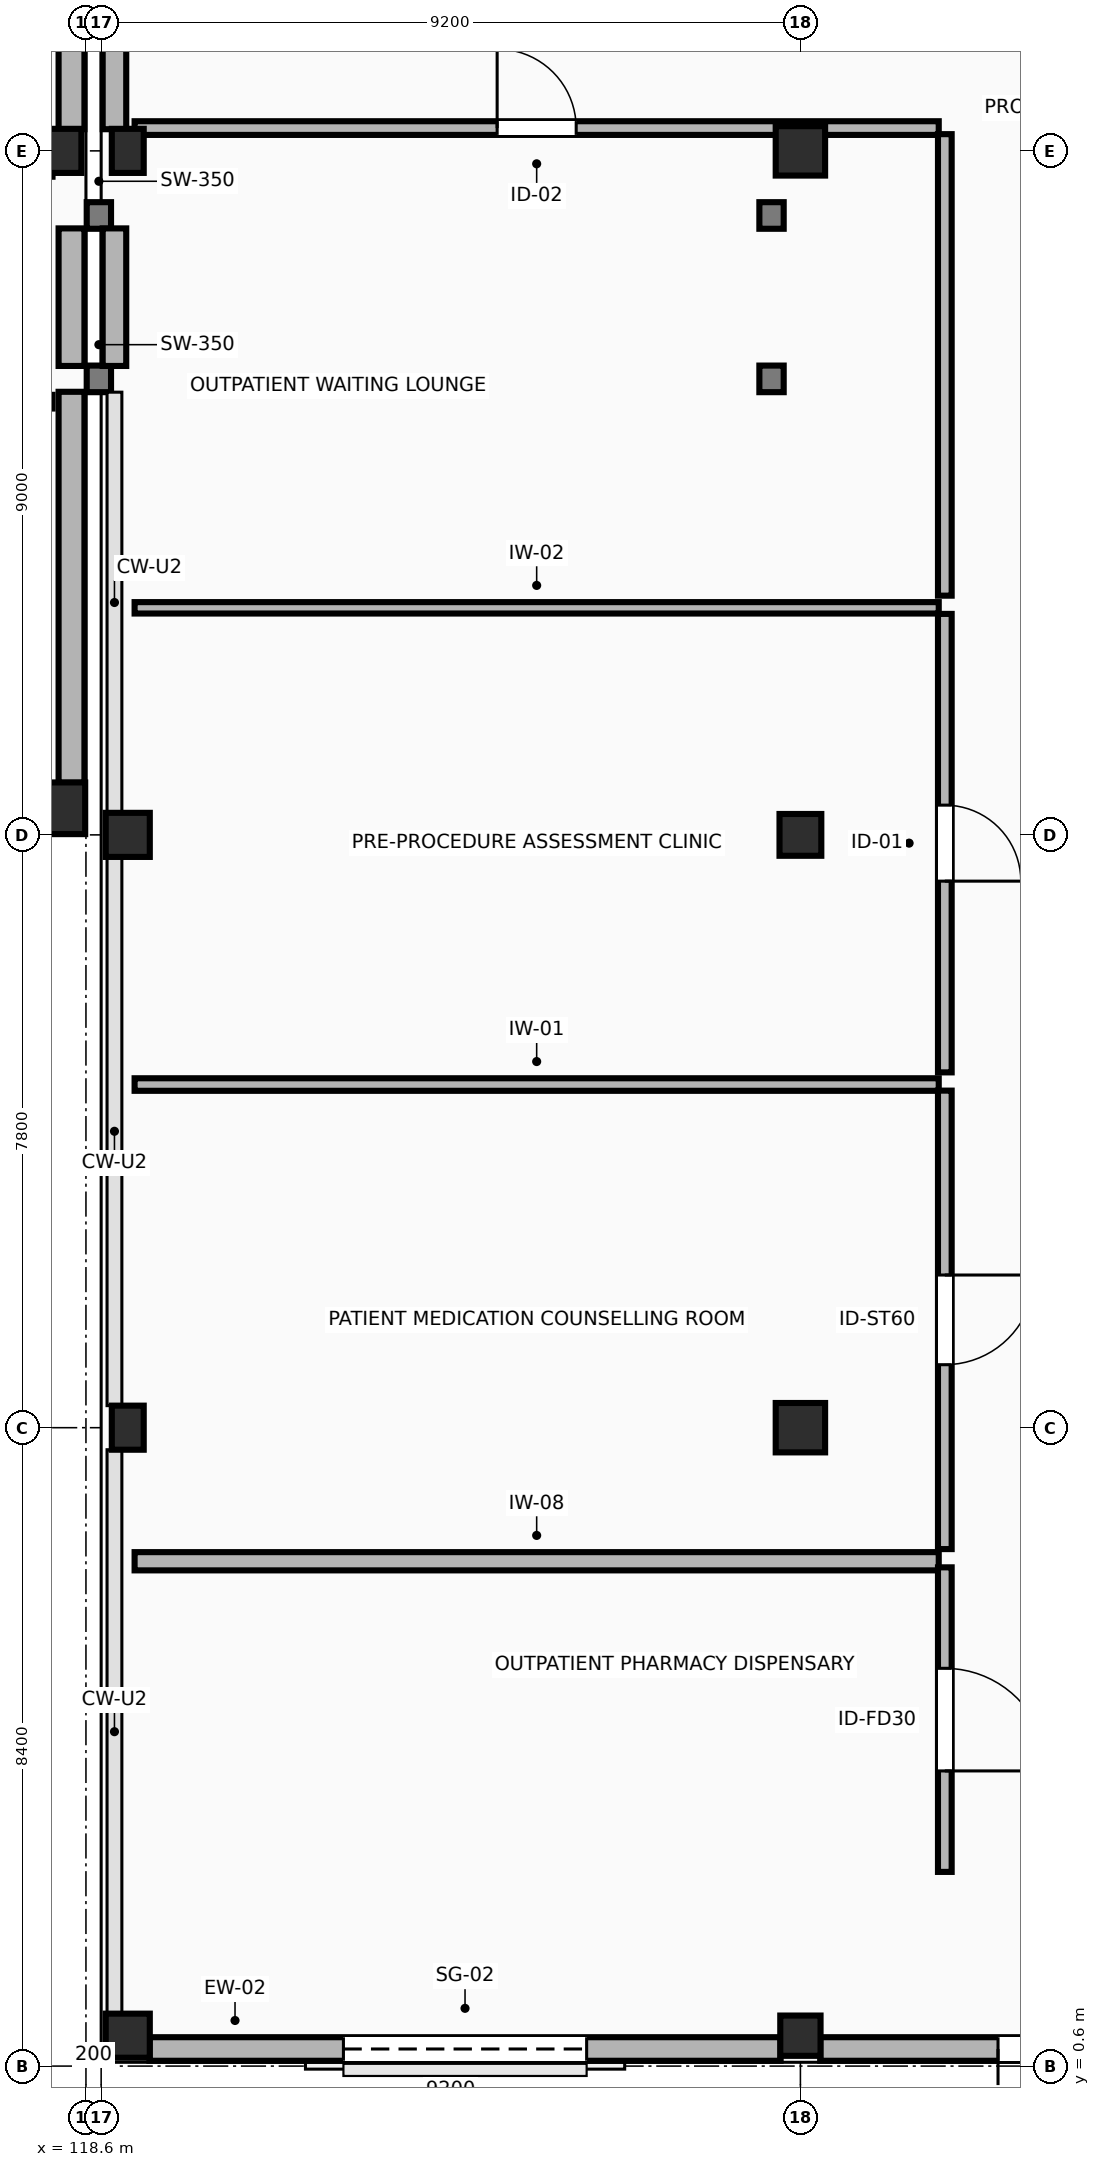
"""IFC4 building model, lengths in metres.
Left out: names, types, materials, properties, quantities, classifications, styles, units other than length and angle.
Written with IfcOpenShell. Run it as: python <this file> out.ifc"""

import sys

from ifc_helpers import new_model, si_unit, direction, frame, frame_2d, origin, origin_2d, place, context, subcontext, project, spatial, rectangle, extrude, element, fill, save


model = new_model("IFC4")
c1 = context("Model", 3, precision=1e-05, world=origin(), true_north=direction((0.0, 1.0)))
c2 = subcontext(c1, "Body", "Model", "MODEL_VIEW")
j1 = project(units=[si_unit("LENGTHUNIT", "METRE"), si_unit("PLANEANGLEUNIT", "RADIAN")], contexts=[c1])
p1 = place(None, origin())
s1 = spatial("IfcSite", under=j1, at=p1, CompositionType="ELEMENT")
p2 = place(p1, origin())
s2 = spatial("IfcBuilding", under=s1, at=p2, CompositionType="ELEMENT")
p3 = place(p2, origin())
s3 = spatial("IfcBuildingStorey", under=s2, at=p3, CompositionType="ELEMENT", Elevation=0.0)
p4 = place(p3, frame((118.25, 17.15, -1.75), z_axis=(0.0, 0.0, 1.0), x_axis=(1.0, 0.0, 0.0)))
e1 = element("IfcColumn", 1, at=p4, inside=s3, PredefinedType="COLUMN", context=c2, shape_type="SweptSolid", body=[
    extrude(rectangle(XDim=0.68, YDim=0.68, at=origin_2d()), origin(), (0.0, 0.0, 1.0), 7.15),
])
for number, where, z_axis, x_axis in (
    (2, (118.25, 25.8, -1.75), (0.0, 0.0, 1.0), (1.0, 0.0, 0.0)),
    (3, (119.15, 1.0, -1.75), (0.0, 0.0, 1.0), (1.0, 0.0, 0.0)),
):
    element("IfcColumn", number, at=place(p3, frame(where, z_axis=z_axis, x_axis=x_axis)), inside=s3, PredefinedType="COLUMN", context=c2, shape_type="SweptSolid", body=[
        extrude(rectangle(XDim=0.58, YDim=0.58, at=origin_2d()), origin(), (0.0, 0.0, 1.0), 7.15),
    ])
p5 = place(p3, frame((119.15, 9.0, -1.75), z_axis=(0.0, 0.0, 1.0), x_axis=(1.0, 0.0, 0.0)))
e4 = element("IfcColumn", 4, at=p5, inside=s3, PredefinedType="COLUMN", context=c2, shape_type="SweptSolid", body=[
    extrude(rectangle(XDim=0.42, YDim=0.58, at=origin_2d()), origin(), (0.0, 0.0, 1.0), 7.15),
])
p6 = place(p3, frame((119.15, 16.8, 0.0), z_axis=(0.0, 0.0, 1.0), x_axis=(1.0, 0.0, 0.0)))
e5 = element("IfcColumn", 5, at=p6, inside=s3, PredefinedType="COLUMN", context=c2, shape_type="SweptSolid", body=[
    extrude(rectangle(XDim=0.58, YDim=0.58, at=origin_2d()), origin(), (0.0, 0.0, 1.0), 5.4),
])
p7 = place(p3, frame((119.15, 25.8, 0.0), z_axis=(0.0, 0.0, 1.0), x_axis=(1.0, 0.0, 0.0)))
e6 = element("IfcColumn", 6, at=p7, inside=s3, PredefinedType="COLUMN", context=c2, shape_type="SweptSolid", body=[
    extrude(rectangle(XDim=0.42, YDim=0.58, at=origin_2d()), origin(), (0.0, 0.0, 1.0), 5.4),
])
p8 = place(p3, frame((128.0, 1.0, -1.75), z_axis=(0.0, 0.0, 1.0), x_axis=(1.0, 0.0, 0.0)))
e7 = element("IfcColumn", 7, at=p8, inside=s3, PredefinedType="COLUMN", context=c2, shape_type="SweptSolid", body=[
    extrude(rectangle(XDim=0.53, YDim=0.53, at=origin_2d()), origin(), (0.0, 0.0, 1.0), 7.15),
])
p9 = place(p3, frame((128.0, 9.0, -1.75), z_axis=(0.0, 0.0, 1.0), x_axis=(1.0, 0.0, 0.0)))
e8 = element("IfcColumn", 8, at=p9, inside=s3, PredefinedType="COLUMN", context=c2, shape_type="SweptSolid", body=[
    extrude(rectangle(XDim=0.65, YDim=0.65, at=origin_2d()), origin(), (0.0, 0.0, 1.0), 7.15),
])
p10 = place(p3, frame((128.0, 16.8, 0.0), z_axis=(0.0, 0.0, 1.0), x_axis=(1.0, 0.0, 0.0)))
e9 = element("IfcColumn", 9, at=p10, inside=s3, PredefinedType="COLUMN", context=c2, shape_type="SweptSolid", body=[
    extrude(rectangle(XDim=0.55, YDim=0.55, at=origin_2d()), origin(), (0.0, 0.0, 1.0), 5.4),
])
p11 = place(p3, frame((128.0, 25.8, 0.0), z_axis=(0.0, 0.0, 1.0), x_axis=(1.0, 0.0, 0.0)))
e10 = element("IfcColumn", 10, at=p11, inside=s3, PredefinedType="COLUMN", context=c2, shape_type="SweptSolid", body=[
    extrude(rectangle(XDim=0.65, YDim=0.65, at=origin_2d()), origin(), (0.0, 0.0, 1.0), 5.4),
])
for number, where, z_axis, x_axis in (
    (11, (118.61, 22.8, -0.35), (0.0, 0.0, 1.0), (1.0, 0.0, 0.0)),
    (12, (118.61, 24.95, -0.35), (0.0, 0.0, 1.0), (1.0, 0.0, 0.0)),
):
    element("IfcWall", number, at=place(p3, frame(where, z_axis=z_axis, x_axis=x_axis)), inside=s3, PredefinedType="SHEAR", context=c2, shape_type="SweptSolid", body=[
        extrude(rectangle(XDim=0.32, YDim=0.35, at=frame_2d((0.16, 0.0))), origin(), (0.0, 0.0, 1.0), 3.873),
    ])
for number, where, z_axis, x_axis in (
    (13, (127.46, 22.8, 0.0), (0.0, 0.0, 1.0), (1.0, 0.0, 0.0)),
    (14, (127.46, 24.95, 0.0), (0.0, 0.0, 1.0), (1.0, 0.0, 0.0)),
):
    element("IfcWall", number, at=place(p3, frame(where, z_axis=z_axis, x_axis=x_axis)), inside=s3, PredefinedType="SHEAR", context=c2, shape_type="SweptSolid", body=[
        extrude(rectangle(XDim=0.32, YDim=0.35, at=frame_2d((0.16, 0.0))), origin(), (0.0, 0.0, 1.0), 5.4),
    ])
p12 = place(p3, frame((118.41, 17.485, 0.0), z_axis=(0.0, 0.0, 1.0), x_axis=(0.0, 1.0, 0.0)))
e15 = element("IfcWall", 15, at=p12, inside=s3, PredefinedType="STANDARD", context=c2, shape_type="SweptSolid", body=[
    extrude(rectangle(XDim=5.145, YDim=0.34, at=frame_2d((2.572, 0.0))), origin(), (0.0, 0.0, 1.0), 3.508),
])
p13 = place(p3, frame((118.41, 22.97, 0.0), z_axis=(0.0, 0.0, 1.0), x_axis=(0.0, 1.0, 0.0)))
e16 = element("IfcWall", 16, at=p13, inside=s3, PredefinedType="STANDARD", context=c2, shape_type="SweptSolid", body=[
    extrude(rectangle(XDim=1.81, YDim=0.34, at=frame_2d((0.905, 0.0))), origin(), (0.0, 0.0, 1.0), 3.508),
])
p14 = place(p3, frame((118.41, 26.085, 0.0), z_axis=(0.0, 0.0, 1.0), x_axis=(0.0, 1.0, 0.0)))
e17 = element("IfcWall", 17, at=p14, inside=s3, PredefinedType="STANDARD", context=c2, shape_type="SweptSolid", body=[
    extrude(rectangle(XDim=7.83, YDim=0.34, at=frame_2d((3.915, 0.0))), origin(), (0.0, 0.0, 1.0), 4.565),
])
p15 = place(p3, frame((119.435, 0.825, 0.0), z_axis=(0.0, 0.0, 1.0), x_axis=(1.0, 0.0, 0.0)))
e18 = element("IfcWall", 18, at=p15, inside=s3, PredefinedType="STANDARD", context=c2, shape_type="SweptSolid", body=[
    extrude(rectangle(XDim=8.305, YDim=0.31, at=frame_2d((4.152, 0.0))), origin(), (0.0, 0.0, 1.0), 4.42),
])
p16 = place(p15, frame((2.552, 0.0, 0.0)))
e19 = element("IfcOpeningElement", 19, at=p16, cuts=e18, PredefinedType="OPENING", context=c2, shape_type="SweptSolid", body=[
    extrude(rectangle(XDim=3.2, YDim=2.8, at=frame_2d((1.6, 1.4))), frame((0.0, 0.165, 0.0), z_axis=(0.0, -1.0, 0.0), x_axis=(1.0, 0.0, 0.0)), (0.0, 0.0, 1.0), 0.33),
])
p17 = place(p3, frame((128.26, 0.825, 0.0), z_axis=(0.0, 0.0, 1.0), x_axis=(1.0, 0.0, 0.0)))
e20 = element("IfcWall", 20, at=p17, inside=s3, PredefinedType="STANDARD", context=c2, shape_type="SweptSolid", body=[
    extrude(rectangle(XDim=8.735, YDim=0.31, at=frame_2d((4.368, 0.0))), origin(), (0.0, 0.0, 1.0), 4.42),
])
p18 = place(p17, frame((2.34, 0.0, 0.0)))
e21 = element("IfcOpeningElement", 21, at=p18, cuts=e20, PredefinedType="OPENING", context=c2, shape_type="SweptSolid", body=[
    extrude(rectangle(XDim=1.8, YDim=2.3, at=frame_2d((0.9, 1.15))), frame((0.0, 0.165, 0.0), z_axis=(0.0, -1.0, 0.0), x_axis=(1.0, 0.0, 0.0)), (0.0, 0.0, 1.0), 0.33),
])
p19 = place(p3, frame((118.975, 34.315, 0.0), z_axis=(0.0, 0.0, 1.0), x_axis=(0.0, -1.0, 0.0)))
e22 = element("IfcWall", 22, at=p19, inside=s3, PredefinedType="STANDARD", context=c2, shape_type="SweptSolid", body=[
    extrude(rectangle(XDim=8.23, YDim=0.31, at=frame_2d((4.115, 0.0))), origin(), (0.0, 0.0, 1.0), 4.545),
])
p20 = place(p3, frame((118.975, 24.78, 0.0), z_axis=(0.0, 0.0, 1.0), x_axis=(0.0, -1.0, 0.0)))
e23 = element("IfcWall", 23, at=p20, inside=s3, PredefinedType="STANDARD", context=c2, shape_type="SweptSolid", body=[
    extrude(rectangle(XDim=1.81, YDim=0.31, at=frame_2d((0.905, 0.0))), origin(), (0.0, 0.0, 1.0), 3.508),
])
p21 = place(p3, frame((118.16, 25.55, 0.0), z_axis=(0.0, 0.0, 1.0), x_axis=(-1.0, 0.0, 0.0)))
e24 = element("IfcWall", 24, at=p21, inside=s3, PredefinedType="PARTITIONING", context=c2, shape_type="SweptSolid", body=[
    extrude(rectangle(XDim=6.027, YDim=0.18, at=frame_2d((3.013, 0.0))), origin(), (0.0, 0.0, 1.0), 4.455),
])
p22 = place(p21, frame((2.453, 0.0, 0.0)))
e25 = element("IfcOpeningElement", 25, at=p22, cuts=e24, PredefinedType="OPENING", context=c2, shape_type="SweptSolid", body=[
    extrude(rectangle(XDim=1.12, YDim=2.16, at=frame_2d((0.56, 1.08))), frame((0.0, 0.1, 0.0), z_axis=(0.0, -1.0, 0.0), x_axis=(1.0, 0.0, 0.0)), (0.0, 0.0, 1.0), 0.2),
])
p23 = place(p3, frame((119.24, 7.242, 0.0), z_axis=(0.0, 0.0, 1.0), x_axis=(1.0, 0.0, 0.0)))
e26 = element("IfcWall", 26, at=p23, inside=s3, PredefinedType="PARTITIONING", context=c2, shape_type="SweptSolid", body=[
    extrude(rectangle(XDim=10.58, YDim=0.24, at=frame_2d((5.29, 0.0))), origin(), (0.0, 0.0, 1.0), 5.1),
])
p24 = place(p3, frame((129.9, 7.163, 0.0), z_axis=(0.0, 0.0, 1.0), x_axis=(0.0, -1.0, 0.0)))
e27 = element("IfcWall", 27, at=p24, inside=s3, PredefinedType="PARTITIONING", context=c2, shape_type="SweptSolid", body=[
    extrude(rectangle(XDim=4.008, YDim=0.18, at=frame_2d((2.004, 0.0))), origin(), (0.0, 0.0, 1.0), 5.1),
])
p25 = place(p24, frame((1.329, 0.0, 0.0)))
e28 = element("IfcOpeningElement", 28, at=p25, cuts=e27, PredefinedType="OPENING", context=c2, shape_type="SweptSolid", body=[
    extrude(rectangle(XDim=1.35, YDim=2.2, at=frame_2d((0.675, 1.1))), frame((0.0, 0.1, 0.0), z_axis=(0.0, -1.0, 0.0), x_axis=(1.0, 0.0, 0.0)), (0.0, 0.0, 1.0), 0.2),
])
p26 = place(p3, frame((119.24, 13.515, 0.0), z_axis=(0.0, 0.0, 1.0), x_axis=(1.0, 0.0, 0.0)))
e29 = element("IfcWall", 29, at=p26, inside=s3, PredefinedType="PARTITIONING", context=c2, shape_type="SweptSolid", body=[
    extrude(rectangle(XDim=10.58, YDim=0.165, at=frame_2d((5.29, 0.0))), origin(), (0.0, 0.0, 1.0), 5.1),
])
p27 = place(p3, frame((129.9, 13.435, 0.0), z_axis=(0.0, 0.0, 1.0), x_axis=(0.0, -1.0, 0.0)))
e30 = element("IfcWall", 30, at=p27, inside=s3, PredefinedType="PARTITIONING", context=c2, shape_type="SweptSolid", body=[
    extrude(rectangle(XDim=6.032, YDim=0.18, at=frame_2d((3.016, 0.0))), origin(), (0.0, 0.0, 1.0), 5.1),
])
p28 = place(p27, frame((2.426, 0.0, 0.0)))
e31 = element("IfcOpeningElement", 31, at=p28, cuts=e30, PredefinedType="OPENING", context=c2, shape_type="SweptSolid", body=[
    extrude(rectangle(XDim=1.18, YDim=2.18, at=frame_2d((0.59, 1.09))), frame((0.0, 0.1, 0.0), z_axis=(0.0, -1.0, 0.0), x_axis=(1.0, 0.0, 0.0)), (0.0, 0.0, 1.0), 0.2),
])
p29 = place(p3, frame((119.24, 19.788, 0.0), z_axis=(0.0, 0.0, 1.0), x_axis=(1.0, 0.0, 0.0)))
e32 = element("IfcWall", 32, at=p29, inside=s3, PredefinedType="PARTITIONING", context=c2, shape_type="SweptSolid", body=[
    extrude(rectangle(XDim=10.58, YDim=0.15, at=frame_2d((5.29, 0.0))), origin(), (0.0, 0.0, 1.0), 5.1),
])
p30 = place(p3, frame((129.9, 19.708, 0.0), z_axis=(0.0, 0.0, 1.0), x_axis=(0.0, -1.0, 0.0)))
e33 = element("IfcWall", 33, at=p30, inside=s3, PredefinedType="PARTITIONING", context=c2, shape_type="SweptSolid", body=[
    extrude(rectangle(XDim=6.032, YDim=0.18, at=frame_2d((3.016, 0.0))), origin(), (0.0, 0.0, 1.0), 5.1),
])
p31 = place(p30, frame((2.516, 0.0, 0.0)))
e34 = element("IfcOpeningElement", 34, at=p31, cuts=e33, PredefinedType="OPENING", context=c2, shape_type="SweptSolid", body=[
    extrude(rectangle(XDim=1.0, YDim=2.15, at=frame_2d((0.5, 1.075))), frame((0.0, 0.1, 0.0), z_axis=(0.0, -1.0, 0.0), x_axis=(1.0, 0.0, 0.0)), (0.0, 0.0, 1.0), 0.2),
])
p32 = place(p3, frame((119.24, 26.1, 0.0), z_axis=(0.0, 0.0, 1.0), x_axis=(1.0, 0.0, 0.0)))
e35 = element("IfcWall", 35, at=p32, inside=s3, PredefinedType="PARTITIONING", context=c2, shape_type="SweptSolid", body=[
    extrude(rectangle(XDim=10.58, YDim=0.18, at=frame_2d((5.29, 0.0))), origin(), (0.0, 0.0, 1.0), 4.435),
])
p33 = place(p32, frame((4.77, 0.0, 0.0)))
e36 = element("IfcOpeningElement", 36, at=p33, cuts=e35, PredefinedType="OPENING", context=c2, shape_type="SweptSolid", body=[
    extrude(rectangle(XDim=1.04, YDim=2.15, at=frame_2d((0.52, 1.075))), frame((0.0, 0.1, 0.0), z_axis=(0.0, -1.0, 0.0), x_axis=(1.0, 0.0, 0.0)), (0.0, 0.0, 1.0), 0.2),
])
p34 = place(p3, frame((129.9, 26.02, 0.0), z_axis=(0.0, 0.0, 1.0), x_axis=(0.0, -1.0, 0.0)))
e37 = element("IfcWall", 37, at=p34, inside=s3, PredefinedType="PARTITIONING", context=c2, shape_type="SweptSolid", body=[
    extrude(rectangle(XDim=6.073, YDim=0.18, at=frame_2d((3.036, 0.0))), origin(), (0.0, 0.0, 1.0), 5.1),
])
p35 = place(p16, frame((3.2, 0.0, 0.0), z_axis=(0.0, 0.0, 1.0), x_axis=(-1.0, 0.0, 0.0)))
e38 = element("IfcDoor", 38, at=p35, inside=s3, OperationType="DOUBLE_DOOR_SINGLE_SWING", PredefinedType="GATE", context=c2, shape_type="SweptSolid", body=[
    extrude(rectangle(XDim=3.2, YDim=2.8, at=frame_2d((1.6, 1.4))), frame((0.0, 0.025, 0.0), z_axis=(0.0, -1.0, 0.0), x_axis=(1.0, 0.0, 0.0)), (0.0, 0.0, 1.0), 0.05),
])
fill(e19, e38)
p36 = place(p18, frame((1.8, 0.0, 0.0), z_axis=(0.0, 0.0, 1.0), x_axis=(-1.0, 0.0, 0.0)))
e39 = element("IfcDoor", 39, at=p36, inside=s3, OperationType="DOUBLE_DOOR_SINGLE_SWING", PredefinedType="DOOR", context=c2, shape_type="SweptSolid", body=[
    extrude(rectangle(XDim=1.8, YDim=2.3, at=frame_2d((0.9, 1.15))), frame((0.0, 0.025, 0.0), z_axis=(0.0, -1.0, 0.0), x_axis=(1.0, 0.0, 0.0)), (0.0, 0.0, 1.0), 0.05),
])
fill(e21, e39)
p37 = place(p25, origin())
e40 = element("IfcDoor", 40, at=p37, inside=s3, OperationType="SINGLE_SWING_RIGHT", PredefinedType="DOOR", context=c2, shape_type="SweptSolid", body=[
    extrude(rectangle(XDim=1.35, YDim=2.2, at=frame_2d((0.675, 1.1))), frame((0.0, 0.025, 0.0), z_axis=(0.0, -1.0, 0.0), x_axis=(1.0, 0.0, 0.0)), (0.0, 0.0, 1.0), 0.05),
])
fill(e28, e40)
p38 = place(p28, origin())
e41 = element("IfcDoor", 41, at=p38, inside=s3, OperationType="SINGLE_SWING_LEFT", PredefinedType="DOOR", context=c2, shape_type="SweptSolid", body=[
    extrude(rectangle(XDim=1.18, YDim=2.18, at=frame_2d((0.59, 1.09))), frame((0.0, 0.025, 0.0), z_axis=(0.0, -1.0, 0.0), x_axis=(1.0, 0.0, 0.0)), (0.0, 0.0, 1.0), 0.05),
])
fill(e31, e41)
p39 = place(p31, origin())
e42 = element("IfcDoor", 42, at=p39, inside=s3, OperationType="SINGLE_SWING_RIGHT", PredefinedType="DOOR", context=c2, shape_type="SweptSolid", body=[
    extrude(rectangle(XDim=1.0, YDim=2.15, at=frame_2d((0.5, 1.075))), frame((0.0, 0.025, 0.0), z_axis=(0.0, -1.0, 0.0), x_axis=(1.0, 0.0, 0.0)), (0.0, 0.0, 1.0), 0.05),
])
fill(e34, e42)
p40 = place(p33, origin())
e43 = element("IfcDoor", 43, at=p40, inside=s3, OperationType="SINGLE_SWING_LEFT", PredefinedType="DOOR", context=c2, shape_type="SweptSolid", body=[
    extrude(rectangle(XDim=1.04, YDim=2.15, at=frame_2d((0.52, 1.075))), frame((0.0, 0.025, 0.0), z_axis=(0.0, -1.0, 0.0), x_axis=(1.0, 0.0, 0.0)), (0.0, 0.0, 1.0), 0.05),
])
fill(e36, e43)
save(model, sys.argv[1])
